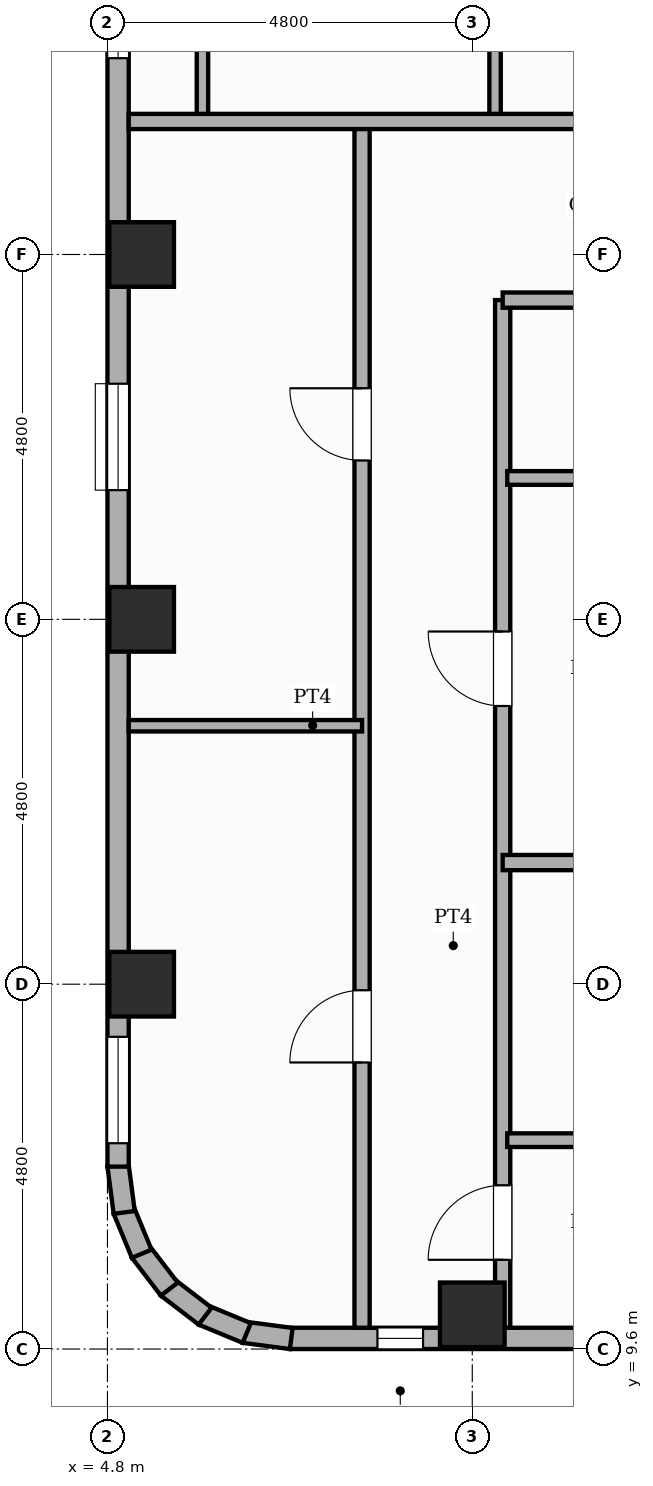
"""IFC4 building model, lengths in metres.
Left out: names, types, materials, properties, quantities, classifications, styles, units other than length and angle.
Written with IfcOpenShell. Run it as: python <this file> out.ifc"""

import sys

from ifc_helpers import new_model, si_unit, direction, frame, frame_2d, origin, origin_2d, place, context, subcontext, project, spatial, rectangle, extrude, element, fill, save


model = new_model("IFC4")
c1 = context("Model", 3, precision=1e-05, world=origin(), true_north=direction((0.0, 1.0)))
c2 = subcontext(c1, "Body", "Model", "MODEL_VIEW")
j1 = project(units=[si_unit("LENGTHUNIT", "METRE"), si_unit("PLANEANGLEUNIT", "RADIAN")], contexts=[c1])
p1 = place(None, origin())
s1 = spatial("IfcSite", under=j1, at=p1, CompositionType="ELEMENT")
p2 = place(p1, origin())
s2 = spatial("IfcBuilding", under=s1, at=p2, CompositionType="ELEMENT")
p3 = place(p2, frame((0.0, 0.0, 203.8)))
s3 = spatial("IfcBuildingStorey", under=s2, at=p3, CompositionType="ELEMENT", Elevation=203.8)
for number, where, z_axis, x_axis in (
    (1, (5.25, 14.4, 0.0), (0.0, 0.0, 1.0), (1.0, 0.0, 0.0)),
    (2, (5.25, 19.2, 0.0), (0.0, 0.0, 1.0), (1.0, 0.0, 0.0)),
    (3, (5.25, 24.0, 0.0), (0.0, 0.0, 1.0), (1.0, 0.0, 0.0)),
    (4, (9.6, 10.05, 0.0), (0.0, 0.0, 1.0), (1.0, 0.0, 0.0)),
):
    element("IfcColumn", number, at=place(p3, frame(where, z_axis=z_axis, x_axis=x_axis)), inside=s3, PredefinedType="COLUMN", context=c2, shape_type="SweptSolid", body=[
        extrude(rectangle(XDim=0.85, YDim=0.85, at=origin_2d()), origin(), (0.0, 0.0, 1.0), 3.6),
    ])
p4 = place(p3, frame((21.6, 9.74, 0.0), z_axis=(0.0, 0.0, 1.0), x_axis=(-1.0, 0.0, 0.0)))
e5 = element("IfcWall", 5, at=p4, inside=s3, PredefinedType="STANDARD", context=c2, shape_type="SweptSolid", body=[
    extrude(rectangle(XDim=14.4, YDim=0.28, at=frame_2d((7.2, 0.0))), origin(), (0.0, 0.0, 1.0), 2.66),
])
p5 = place(p4, frame((12.647, 0.0, 0.45)))
e6 = element("IfcOpeningElement", 6, at=p5, cuts=e5, PredefinedType="OPENING", context=c2, shape_type="SweptSolid", body=[
    extrude(rectangle(XDim=0.6, YDim=1.8, at=frame_2d((0.3, 0.9))), frame((0.0, 0.15, 0.0), z_axis=(0.0, -1.0, 0.0), x_axis=(1.0, 0.0, 0.0)), (0.0, 0.0, 1.0), 0.3),
])
p6 = place(p4, frame((5.513, 0.0, 0.45)))
e7 = element("IfcOpeningElement", 7, at=p6, cuts=e5, PredefinedType="OPENING", context=c2, shape_type="SweptSolid", body=[
    extrude(rectangle(XDim=0.95, YDim=1.8, at=frame_2d((0.475, 0.9))), frame((0.0, 0.15, 0.0), z_axis=(0.0, -1.0, 0.0), x_axis=(1.0, 0.0, 0.0)), (0.0, 0.0, 1.0), 0.3),
])
p7 = place(p4, frame((0.308, 0.0, 0.65)))
e8 = element("IfcOpeningElement", 8, at=p7, cuts=e5, PredefinedType="OPENING", context=c2, shape_type="SweptSolid", body=[
    extrude(rectangle(XDim=1.4, YDim=1.1, at=frame_2d((0.7, 0.55))), frame((0.0, 0.15, 0.0), z_axis=(0.0, -1.0, 0.0), x_axis=(1.0, 0.0, 0.0)), (0.0, 0.0, 1.0), 0.3),
])
p8 = place(p3, frame((7.218, 9.739, 0.0), z_axis=(0.0, 0.0, 1.0), x_axis=(-0.9914410257, 0.130555323746, 0.0)))
e9 = element("IfcWall", 9, at=p8, inside=s3, PredefinedType="STANDARD", context=c2, shape_type="SweptSolid", body=[
    extrude(rectangle(XDim=0.626, YDim=0.28, at=frame_2d((0.313, 0.0))), origin(), (0.0, 0.0, 1.0), 3.38),
])
p9 = place(p3, frame((6.632, 9.811, 0.0), z_axis=(0.0, 0.0, 1.0), x_axis=(-0.923836271867, 0.382787856107, 0.0)))
e10 = element("IfcWall", 10, at=p9, inside=s3, PredefinedType="STANDARD", context=c2, shape_type="SweptSolid", body=[
    extrude(rectangle(XDim=0.626, YDim=0.28, at=frame_2d((0.313, 0.0))), origin(), (0.0, 0.0, 1.0), 3.38),
])
for number, where, z_axis, x_axis in (
    (11, (6.085, 10.033, 0.0), (0.0, 0.0, 1.0), (-0.793, 0.609, 0.0)),
    (12, (5.614, 10.388, 0.0), (0.0, 0.0, 1.0), (-0.609, 0.793, 0.0)),
    (13, (5.251, 10.854, 0.0), (0.0, 0.0, 1.0), (-0.383, 0.924, 0.0)),
    (14, (5.021, 11.397, 0.0), (0.0, 0.0, 1.0), (-0.131, 0.991, 0.0)),
):
    element("IfcWall", number, at=place(p3, frame(where, z_axis=z_axis, x_axis=x_axis)), inside=s3, PredefinedType="STANDARD", context=c2, shape_type="SweptSolid", body=[
        extrude(rectangle(XDim=0.626, YDim=0.28, at=frame_2d((0.313, 0.0))), origin(), (0.0, 0.0, 1.0), 3.38),
    ])
p10 = place(p3, frame((4.94, 12.0, 0.0), z_axis=(0.0, 0.0, 1.0), x_axis=(0.0, 1.0, 0.0)))
e15 = element("IfcWall", 15, at=p10, inside=s3, PredefinedType="STANDARD", context=c2, shape_type="SweptSolid", body=[
    extrude(rectangle(XDim=33.6, YDim=0.28, at=frame_2d((16.8, 0.0))), origin(), (0.0, 0.0, 1.0), 2.66),
])
p11 = place(p10, frame((14.583, 0.0, 0.65)))
e16 = element("IfcOpeningElement", 16, at=p11, cuts=e15, PredefinedType="OPENING", context=c2, shape_type="SweptSolid", body=[
    extrude(rectangle(XDim=1.4, YDim=1.1, at=frame_2d((0.7, 0.55))), frame((0.0, 0.15, 0.0), z_axis=(0.0, -1.0, 0.0), x_axis=(1.0, 0.0, 0.0)), (0.0, 0.0, 1.0), 0.3),
])
p12 = place(p10, frame((0.308, 0.0, 0.65)))
e17 = element("IfcOpeningElement", 17, at=p12, cuts=e15, PredefinedType="OPENING", context=c2, shape_type="SweptSolid", body=[
    extrude(rectangle(XDim=1.4, YDim=1.1, at=frame_2d((0.7, 0.55))), frame((0.0, 0.15, 0.0), z_axis=(0.0, -1.0, 0.0), x_axis=(1.0, 0.0, 0.0)), (0.0, 0.0, 1.0), 0.3),
])
p13 = place(p10, frame((8.9, 0.0, 0.65)))
e18 = element("IfcOpeningElement", 18, at=p13, cuts=e15, PredefinedType="OPENING", context=c2, shape_type="SweptSolid", body=[
    extrude(rectangle(XDim=1.4, YDim=1.1, at=frame_2d((0.7, 0.55))), frame((0.0, 0.15, 0.0), z_axis=(0.0, -1.0, 0.0), x_axis=(1.0, 0.0, 0.0)), (0.0, 0.0, 1.0), 0.3),
])
p14 = place(p3, frame((6.05, 25.75, 0.0), z_axis=(0.0, 0.0, 1.0), x_axis=(0.0, 1.0, 0.0)))
e19 = element("IfcWall", 19, at=p14, inside=s3, PredefinedType="PARTITIONING", context=c2, shape_type="SweptSolid", body=[
    extrude(rectangle(XDim=5.15, YDim=0.15, at=frame_2d((2.575, 0.0))), origin(), (0.0, 0.0, 1.0), 3.38),
])
p15 = place(p3, frame((9.9, 25.75, 0.0), z_axis=(0.0, 0.0, 1.0), x_axis=(0.0, 1.0, 0.0)))
e20 = element("IfcWall", 20, at=p15, inside=s3, PredefinedType="PARTITIONING", context=c2, shape_type="SweptSolid", body=[
    extrude(rectangle(XDim=5.15, YDim=0.15, at=frame_2d((2.575, 0.0))), origin(), (0.0, 0.0, 1.0), 3.38),
])
p16 = place(p15, frame((1.2, 0.0, 0.0)))
e21 = element("IfcOpeningElement", 21, at=p16, cuts=e20, PredefinedType="OPENING", context=c2, shape_type="SweptSolid", body=[
    extrude(rectangle(XDim=0.95, YDim=2.15, at=frame_2d((0.475, 1.075))), frame((0.0, 0.085, 0.0), z_axis=(0.0, -1.0, 0.0), x_axis=(1.0, 0.0, 0.0)), (0.0, 0.0, 1.0), 0.17),
])
p17 = place(p3, frame((8.15, 9.88, 0.0), z_axis=(0.0, 0.0, 1.0), x_axis=(0.0, 1.0, 0.0)))
e22 = element("IfcWall", 22, at=p17, inside=s3, PredefinedType="PARTITIONING", context=c2, shape_type="SweptSolid", body=[
    extrude(rectangle(XDim=15.87, YDim=0.2, at=frame_2d((7.935, 0.0))), origin(), (0.0, 0.0, 1.0), 3.38),
])
p18 = place(p17, frame((3.49, 0.0, 0.0)))
e23 = element("IfcOpeningElement", 23, at=p18, cuts=e22, PredefinedType="OPENING", context=c2, shape_type="SweptSolid", body=[
    extrude(rectangle(XDim=0.95, YDim=2.15, at=frame_2d((0.475, 1.075))), frame((0.0, 0.11, 0.0), z_axis=(0.0, -1.0, 0.0), x_axis=(1.0, 0.0, 0.0)), (0.0, 0.0, 1.0), 0.22),
])
p19 = place(p17, frame((11.41, 0.0, 0.0)))
e24 = element("IfcOpeningElement", 24, at=p19, cuts=e22, PredefinedType="OPENING", context=c2, shape_type="SweptSolid", body=[
    extrude(rectangle(XDim=0.95, YDim=2.15, at=frame_2d((0.475, 1.075))), frame((0.0, 0.11, 0.0), z_axis=(0.0, -1.0, 0.0), x_axis=(1.0, 0.0, 0.0)), (0.0, 0.0, 1.0), 0.22),
])
p20 = place(p3, frame((10.0, 9.88, 0.0), z_axis=(0.0, 0.0, 1.0), x_axis=(0.0, 1.0, 0.0)))
e25 = element("IfcWall", 25, at=p20, inside=s3, PredefinedType="PARTITIONING", context=c2, shape_type="SweptSolid", body=[
    extrude(rectangle(XDim=13.52, YDim=0.2, at=frame_2d((6.76, 0.0))), origin(), (0.0, 0.0, 1.0), 3.38),
])
p21 = place(p20, frame((0.894, 0.0, 0.0)))
e26 = element("IfcOpeningElement", 26, at=p21, cuts=e25, PredefinedType="OPENING", context=c2, shape_type="SweptSolid", body=[
    extrude(rectangle(XDim=0.98, YDim=2.18, at=frame_2d((0.49, 1.09))), frame((0.0, 0.11, 0.0), z_axis=(0.0, -1.0, 0.0), x_axis=(1.0, 0.0, 0.0)), (0.0, 0.0, 1.0), 0.22),
])
p22 = place(p20, frame((8.18, 0.0, 0.0)))
e27 = element("IfcOpeningElement", 27, at=p22, cuts=e25, PredefinedType="OPENING", context=c2, shape_type="SweptSolid", body=[
    extrude(rectangle(XDim=0.98, YDim=2.18, at=frame_2d((0.49, 1.09))), frame((0.0, 0.11, 0.0), z_axis=(0.0, -1.0, 0.0), x_axis=(1.0, 0.0, 0.0)), (0.0, 0.0, 1.0), 0.22),
])
p23 = place(p3, frame((10.0, 23.4, 0.0), z_axis=(0.0, 0.0, 1.0), x_axis=(1.0, 0.0, 0.0)))
e28 = element("IfcWall", 28, at=p23, inside=s3, PredefinedType="PARTITIONING", context=c2, shape_type="SweptSolid", body=[
    extrude(rectangle(XDim=13.72, YDim=0.2, at=frame_2d((6.86, 0.0))), origin(), (0.0, 0.0, 1.0), 3.38),
])
p24 = place(p3, frame((5.08, 25.75, 0.0), z_axis=(0.0, 0.0, 1.0), x_axis=(1.0, 0.0, 0.0)))
e29 = element("IfcWall", 29, at=p24, inside=s3, PredefinedType="PARTITIONING", context=c2, shape_type="SweptSolid", body=[
    extrude(rectangle(XDim=8.52, YDim=0.2, at=frame_2d((4.26, 0.0))), origin(), (0.0, 0.0, 1.0), 3.38),
])
p25 = place(p3, frame((5.08, 17.8, 0.0), z_axis=(0.0, 0.0, 1.0), x_axis=(1.0, 0.0, 0.0)))
e30 = element("IfcWall", 30, at=p25, inside=s3, PredefinedType="PARTITIONING", context=c2, shape_type="SweptSolid", body=[
    extrude(rectangle(XDim=3.07, YDim=0.15, at=frame_2d((1.535, 0.0))), origin(), (0.0, 0.0, 1.0), 3.38),
])
p26 = place(p3, frame((10.06, 12.348, 0.0), z_axis=(0.0, 0.0, 1.0), x_axis=(1.0, 0.0, 0.0)))
e31 = element("IfcWall", 31, at=p26, inside=s3, PredefinedType="PLUMBINGWALL", context=c2, shape_type="SweptSolid", body=[
    extrude(rectangle(XDim=13.66, YDim=0.18, at=frame_2d((6.83, 0.0))), origin(), (0.0, 0.0, 1.0), 3.38),
])
p27 = place(p26, frame((1.091, 0.0, 0.0)))
e32 = element("IfcOpeningElement", 32, at=p27, cuts=e31, PredefinedType="OPENING", context=c2, shape_type="SweptSolid", body=[
    extrude(rectangle(XDim=0.86, YDim=2.1, at=frame_2d((0.43, 1.05))), frame((0.0, 0.1, 0.0), z_axis=(0.0, -1.0, 0.0), x_axis=(1.0, 0.0, 0.0)), (0.0, 0.0, 1.0), 0.2),
])
p28 = place(p26, frame((4.868, 0.0, 0.0)))
e33 = element("IfcOpeningElement", 33, at=p28, cuts=e31, PredefinedType="OPENING", context=c2, shape_type="SweptSolid", body=[
    extrude(rectangle(XDim=0.9, YDim=2.15, at=frame_2d((0.45, 1.075))), frame((0.0, 0.1, 0.0), z_axis=(0.0, -1.0, 0.0), x_axis=(1.0, 0.0, 0.0)), (0.0, 0.0, 1.0), 0.2),
])
p29 = place(p26, frame((9.897, 0.0, 0.0)))
e34 = element("IfcOpeningElement", 34, at=p29, cuts=e31, PredefinedType="OPENING", context=c2, shape_type="SweptSolid", body=[
    extrude(rectangle(XDim=0.9, YDim=2.15, at=frame_2d((0.45, 1.075))), frame((0.0, 0.1, 0.0), z_axis=(0.0, -1.0, 0.0), x_axis=(1.0, 0.0, 0.0)), (0.0, 0.0, 1.0), 0.2),
])
p30 = place(p3, frame((10.0, 16.0, 0.0), z_axis=(0.0, 0.0, 1.0), x_axis=(1.0, 0.0, 0.0)))
e35 = element("IfcWall", 35, at=p30, inside=s3, PredefinedType="SOLIDWALL", context=c2, shape_type="SweptSolid", body=[
    extrude(rectangle(XDim=13.72, YDim=0.2, at=frame_2d((6.86, 0.0))), origin(), (0.0, 0.0, 1.0), 3.38),
])
p31 = place(p3, frame((10.06, 21.06, 0.0), z_axis=(0.0, 0.0, 1.0), x_axis=(1.0, 0.0, 0.0)))
e36 = element("IfcWall", 36, at=p31, inside=s3, PredefinedType="PLUMBINGWALL", context=c2, shape_type="SweptSolid", body=[
    extrude(rectangle(XDim=13.66, YDim=0.18, at=frame_2d((6.83, 0.0))), origin(), (0.0, 0.0, 1.0), 3.38),
])
p32 = place(p31, frame((1.091, 0.0, 0.0)))
e37 = element("IfcOpeningElement", 37, at=p32, cuts=e36, PredefinedType="OPENING", context=c2, shape_type="SweptSolid", body=[
    extrude(rectangle(XDim=0.86, YDim=2.1, at=frame_2d((0.43, 1.05))), frame((0.0, 0.1, 0.0), z_axis=(0.0, -1.0, 0.0), x_axis=(1.0, 0.0, 0.0)), (0.0, 0.0, 1.0), 0.2),
])
p33 = place(p31, frame((4.868, 0.0, 0.0)))
e38 = element("IfcOpeningElement", 38, at=p33, cuts=e36, PredefinedType="OPENING", context=c2, shape_type="SweptSolid", body=[
    extrude(rectangle(XDim=0.9, YDim=2.15, at=frame_2d((0.45, 1.075))), frame((0.0, 0.1, 0.0), z_axis=(0.0, -1.0, 0.0), x_axis=(1.0, 0.0, 0.0)), (0.0, 0.0, 1.0), 0.2),
])
p34 = place(p31, frame((9.897, 0.0, 0.0)))
e39 = element("IfcOpeningElement", 39, at=p34, cuts=e36, PredefinedType="OPENING", context=c2, shape_type="SweptSolid", body=[
    extrude(rectangle(XDim=0.9, YDim=2.15, at=frame_2d((0.45, 1.075))), frame((0.0, 0.1, 0.0), z_axis=(0.0, -1.0, 0.0), x_axis=(1.0, 0.0, 0.0)), (0.0, 0.0, 1.0), 0.2),
])
p35 = place(p5, origin())
e40 = element("IfcWindow", 40, at=p35, inside=s3, PartitioningType="SINGLE_PANEL", PredefinedType="WINDOW", context=c2, shape_type="SweptSolid", body=[
    extrude(rectangle(XDim=0.6, YDim=1.8, at=frame_2d((0.3, 0.9))), frame((0.0, 0.03, 0.0), z_axis=(0.0, -1.0, 0.0), x_axis=(1.0, 0.0, 0.0)), (0.0, 0.0, 1.0), 0.06),
])
fill(e6, e40)
p36 = place(p11, origin())
e41 = element("IfcWindow", 41, at=p36, inside=s3, PartitioningType="SINGLE_PANEL", PredefinedType="WINDOW", context=c2, shape_type="SweptSolid", body=[
    extrude(rectangle(XDim=1.4, YDim=1.1, at=frame_2d((0.7, 0.55))), frame((0.0, 0.03, 0.0), z_axis=(0.0, -1.0, 0.0), x_axis=(1.0, 0.0, 0.0)), (0.0, 0.0, 1.0), 0.06),
])
fill(e16, e41)
p37 = place(p12, origin())
e42 = element("IfcWindow", 42, at=p37, inside=s3, PartitioningType="SINGLE_PANEL", PredefinedType="WINDOW", context=c2, shape_type="SweptSolid", body=[
    extrude(rectangle(XDim=1.4, YDim=1.1, at=frame_2d((0.7, 0.55))), frame((0.0, 0.03, 0.0), z_axis=(0.0, -1.0, 0.0), x_axis=(1.0, 0.0, 0.0)), (0.0, 0.0, 1.0), 0.06),
])
fill(e17, e42)
p38 = place(p13, origin())
e43 = element("IfcWindow", 43, at=p38, inside=s3, PartitioningType="SINGLE_PANEL", PredefinedType="WINDOW", context=c2, shape_type="SweptSolid", body=[
    extrude(rectangle(XDim=1.4, YDim=1.1, at=frame_2d((0.7, 0.55))), frame((0.0, 0.03, 0.0), z_axis=(0.0, -1.0, 0.0), x_axis=(1.0, 0.0, 0.0)), (0.0, 0.0, 1.0), 0.06),
])
fill(e18, e43)
p39 = place(p18, origin())
e44 = element("IfcDoor", 44, at=p39, inside=s3, OperationType="SINGLE_SWING_LEFT", PredefinedType="DOOR", context=c2, shape_type="SweptSolid", body=[
    extrude(rectangle(XDim=0.95, YDim=2.15, at=frame_2d((0.475, 1.075))), frame((0.0, 0.025, 0.0), z_axis=(0.0, -1.0, 0.0), x_axis=(1.0, 0.0, 0.0)), (0.0, 0.0, 1.0), 0.05),
])
fill(e23, e44)
p40 = place(p19, origin())
e45 = element("IfcDoor", 45, at=p40, inside=s3, OperationType="SINGLE_SWING_RIGHT", PredefinedType="DOOR", context=c2, shape_type="SweptSolid", body=[
    extrude(rectangle(XDim=0.95, YDim=2.15, at=frame_2d((0.475, 1.075))), frame((0.0, 0.025, 0.0), z_axis=(0.0, -1.0, 0.0), x_axis=(1.0, 0.0, 0.0)), (0.0, 0.0, 1.0), 0.05),
])
fill(e24, e45)
p41 = place(p21, origin())
e46 = element("IfcDoor", 46, at=p41, inside=s3, OperationType="SINGLE_SWING_LEFT", PredefinedType="DOOR", context=c2, shape_type="SweptSolid", body=[
    extrude(rectangle(XDim=0.98, YDim=2.18, at=frame_2d((0.49, 1.09))), frame((0.0, 0.025, 0.0), z_axis=(0.0, -1.0, 0.0), x_axis=(1.0, 0.0, 0.0)), (0.0, 0.0, 1.0), 0.05),
])
fill(e26, e46)
p42 = place(p22, origin())
e47 = element("IfcDoor", 47, at=p42, inside=s3, OperationType="SINGLE_SWING_RIGHT", PredefinedType="DOOR", context=c2, shape_type="SweptSolid", body=[
    extrude(rectangle(XDim=0.98, YDim=2.18, at=frame_2d((0.49, 1.09))), frame((0.0, 0.025, 0.0), z_axis=(0.0, -1.0, 0.0), x_axis=(1.0, 0.0, 0.0)), (0.0, 0.0, 1.0), 0.05),
])
fill(e27, e47)
save(model, sys.argv[1])
